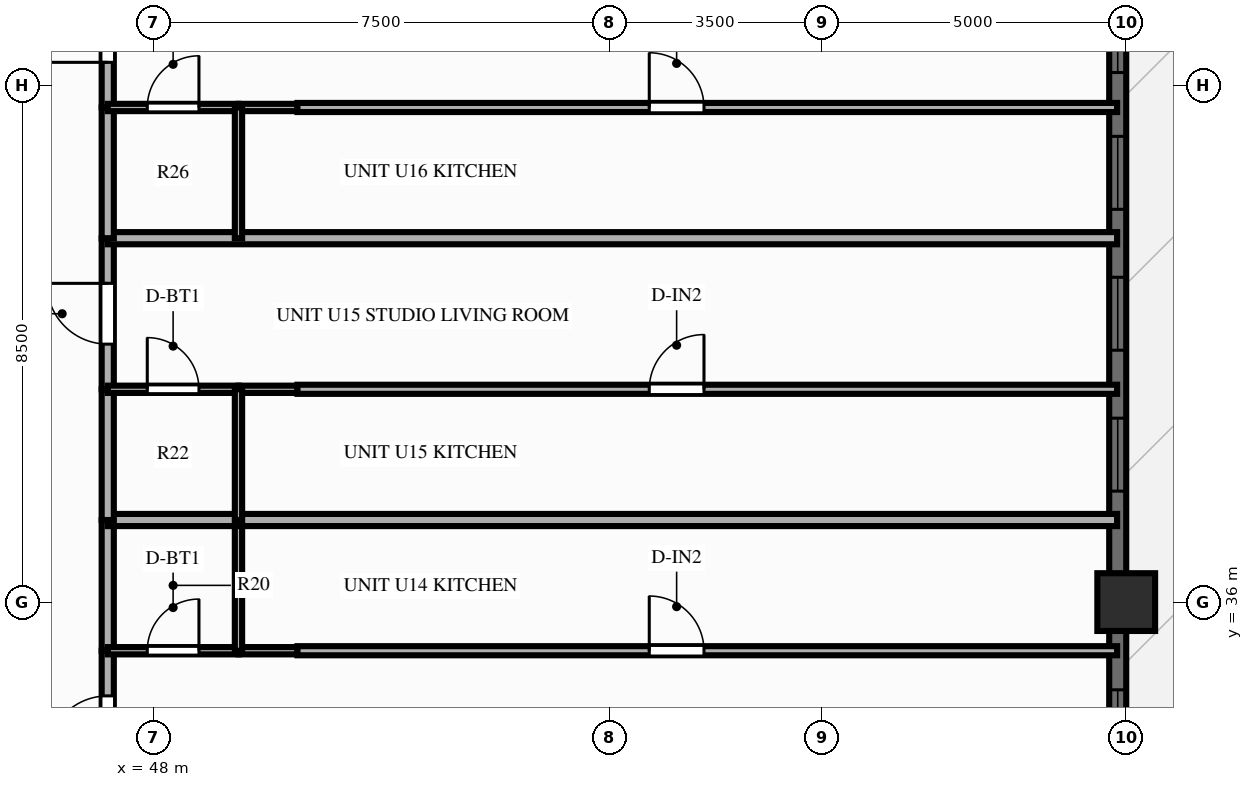
"""IFC4 building model, lengths in metres.
Left out: names, types, materials, properties, quantities, classifications, styles, units other than length and angle.
Written with IfcOpenShell. Run it as: python <this file> out.ifc"""

import sys

from ifc_helpers import new_model, si_unit, direction, frame, frame_2d, origin, origin_2d, place, context, subcontext, project, spatial, rectangle, extrude, source, transform, mapped, element, fill, save


model = new_model("IFC4")
c1 = context("Model", 3, precision=1e-05, world=origin(), true_north=direction((0.0, 1.0)))
c2 = subcontext(c1, "Body", "Model", "MODEL_VIEW")
j1 = project(units=[si_unit("LENGTHUNIT", "METRE"), si_unit("PLANEANGLEUNIT", "RADIAN")], contexts=[c1])
p1 = place(None, origin())
s1 = spatial("IfcSite", under=j1, at=p1, CompositionType="ELEMENT")
p2 = place(p1, origin())
s2 = spatial("IfcBuilding", under=s1, at=p2, CompositionType="ELEMENT")
p3 = place(p2, frame((0.0, 0.0, 122.85)))
s3 = spatial("IfcBuildingStorey", under=s2, at=p3, CompositionType="ELEMENT", Elevation=122.85)
m1 = source(origin(), c2, "Body", "SweptSolid", [
    extrude(rectangle(XDim=0.95, YDim=0.95, at=origin_2d()), origin(), (0.0, 0.0, 1.0), 3.9),
])
p4 = place(p3, frame((64.0, 36.0, 0.0), z_axis=(0.0, 0.0, 1.0), x_axis=(1.0, 0.0, 0.0)))
e1 = element("IfcColumn", 1, at=p4, inside=s3, PredefinedType="COLUMN", context=c2, shape_type="MappedRepresentation", body=[
    mapped(m1, transform((0.0, 0.0, 0.0), scale=1.0)),
])
p5 = place(p3, frame((63.86, 7.2, 0.0), z_axis=(0.0, 0.0, 1.0), x_axis=(0.0, 1.0, 0.0)))
e2 = element("IfcWall", 2, at=p5, inside=s3, PredefinedType="SOLIDWALL", context=c2, shape_type="SweptSolid", body=[
    extrude(rectangle(XDim=39.6, YDim=0.28, at=frame_2d((19.8, 0.0))), origin(), (0.0, 0.0, 1.0), 2.24),
])
p6 = place(p5, frame((0.89, 0.0, 0.25)))
e3 = element("IfcOpeningElement", 3, at=p6, cuts=e2, PredefinedType="OPENING", context=c2, shape_type="SweptSolid", body=[
    extrude(rectangle(XDim=1.2, YDim=1.5, at=frame_2d((0.6, 0.75))), frame((0.0, 0.152, 0.0), z_axis=(0.0, -1.0, 0.0), x_axis=(1.0, 0.0, 0.0)), (0.0, 0.0, 1.0), 0.304),
])
p7 = place(p5, frame((3.14, 0.0, 0.25)))
e4 = element("IfcOpeningElement", 4, at=p7, cuts=e2, PredefinedType="OPENING", context=c2, shape_type="SweptSolid", body=[
    extrude(rectangle(XDim=1.2, YDim=1.5, at=frame_2d((0.6, 0.75))), frame((0.0, 0.152, 0.0), z_axis=(0.0, -1.0, 0.0), x_axis=(1.0, 0.0, 0.0)), (0.0, 0.0, 1.0), 0.304),
])
p8 = place(p5, frame((5.458, 0.0, 0.25)))
e5 = element("IfcOpeningElement", 5, at=p8, cuts=e2, PredefinedType="OPENING", context=c2, shape_type="SweptSolid", body=[
    extrude(rectangle(XDim=1.2, YDim=1.5, at=frame_2d((0.6, 0.75))), frame((0.0, 0.152, 0.0), z_axis=(0.0, -1.0, 0.0), x_axis=(1.0, 0.0, 0.0)), (0.0, 0.0, 1.0), 0.304),
])
p9 = place(p5, frame((7.775, 0.0, 0.25)))
e6 = element("IfcOpeningElement", 6, at=p9, cuts=e2, PredefinedType="OPENING", context=c2, shape_type="SweptSolid", body=[
    extrude(rectangle(XDim=1.2, YDim=1.5, at=frame_2d((0.6, 0.75))), frame((0.0, 0.152, 0.0), z_axis=(0.0, -1.0, 0.0), x_axis=(1.0, 0.0, 0.0)), (0.0, 0.0, 1.0), 0.304),
])
p10 = place(p5, frame((12.242, 0.0, 0.25)))
e7 = element("IfcOpeningElement", 7, at=p10, cuts=e2, PredefinedType="OPENING", context=c2, shape_type="SweptSolid", body=[
    extrude(rectangle(XDim=1.2, YDim=1.5, at=frame_2d((0.6, 0.75))), frame((0.0, 0.152, 0.0), z_axis=(0.0, -1.0, 0.0), x_axis=(1.0, 0.0, 0.0)), (0.0, 0.0, 1.0), 0.304),
])
p11 = place(p5, frame((14.56, 0.0, 0.25)))
e8 = element("IfcOpeningElement", 8, at=p11, cuts=e2, PredefinedType="OPENING", context=c2, shape_type="SweptSolid", body=[
    extrude(rectangle(XDim=1.2, YDim=1.5, at=frame_2d((0.6, 0.75))), frame((0.0, 0.152, 0.0), z_axis=(0.0, -1.0, 0.0), x_axis=(1.0, 0.0, 0.0)), (0.0, 0.0, 1.0), 0.304),
])
p12 = place(p5, frame((16.877, 0.0, 0.25)))
e9 = element("IfcOpeningElement", 9, at=p12, cuts=e2, PredefinedType="OPENING", context=c2, shape_type="SweptSolid", body=[
    extrude(rectangle(XDim=1.2, YDim=1.5, at=frame_2d((0.6, 0.75))), frame((0.0, 0.152, 0.0), z_axis=(0.0, -1.0, 0.0), x_axis=(1.0, 0.0, 0.0)), (0.0, 0.0, 1.0), 0.304),
])
p13 = place(p5, frame((20.35, 0.0, 0.0), z_axis=(0.0, 0.0, 1.0), x_axis=(-1.0, 0.0, 0.0)))
e10 = element("IfcOpeningElement", 10, at=p13, cuts=e2, PredefinedType="OPENING", context=c2, shape_type="SweptSolid", body=[
    extrude(rectangle(XDim=1.1, YDim=2.15, at=frame_2d((0.55, 1.075))), frame((0.0, 0.152, 0.0), z_axis=(0.0, -1.0, 0.0), x_axis=(1.0, 0.0, 0.0)), (0.0, 0.0, 1.0), 0.304),
])
p14 = place(p5, frame((21.522, 0.0, 0.25)))
e11 = element("IfcOpeningElement", 11, at=p14, cuts=e2, PredefinedType="OPENING", context=c2, shape_type="SweptSolid", body=[
    extrude(rectangle(XDim=1.2, YDim=1.5, at=frame_2d((0.6, 0.75))), frame((0.0, 0.152, 0.0), z_axis=(0.0, -1.0, 0.0), x_axis=(1.0, 0.0, 0.0)), (0.0, 0.0, 1.0), 0.304),
])
p15 = place(p5, frame((23.84, 0.0, 0.25)))
e12 = element("IfcOpeningElement", 12, at=p15, cuts=e2, PredefinedType="OPENING", context=c2, shape_type="SweptSolid", body=[
    extrude(rectangle(XDim=1.2, YDim=1.5, at=frame_2d((0.6, 0.75))), frame((0.0, 0.152, 0.0), z_axis=(0.0, -1.0, 0.0), x_axis=(1.0, 0.0, 0.0)), (0.0, 0.0, 1.0), 0.304),
])
p16 = place(p5, frame((26.157, 0.0, 0.25)))
e13 = element("IfcOpeningElement", 13, at=p16, cuts=e2, PredefinedType="OPENING", context=c2, shape_type="SweptSolid", body=[
    extrude(rectangle(XDim=1.2, YDim=1.5, at=frame_2d((0.6, 0.75))), frame((0.0, 0.152, 0.0), z_axis=(0.0, -1.0, 0.0), x_axis=(1.0, 0.0, 0.0)), (0.0, 0.0, 1.0), 0.304),
])
p17 = place(p5, frame((30.625, 0.0, 0.25)))
e14 = element("IfcOpeningElement", 14, at=p17, cuts=e2, PredefinedType="OPENING", context=c2, shape_type="SweptSolid", body=[
    extrude(rectangle(XDim=1.2, YDim=1.5, at=frame_2d((0.6, 0.75))), frame((0.0, 0.152, 0.0), z_axis=(0.0, -1.0, 0.0), x_axis=(1.0, 0.0, 0.0)), (0.0, 0.0, 1.0), 0.304),
])
p18 = place(p5, frame((32.942, 0.0, 0.25)))
e15 = element("IfcOpeningElement", 15, at=p18, cuts=e2, PredefinedType="OPENING", context=c2, shape_type="SweptSolid", body=[
    extrude(rectangle(XDim=1.2, YDim=1.5, at=frame_2d((0.6, 0.75))), frame((0.0, 0.152, 0.0), z_axis=(0.0, -1.0, 0.0), x_axis=(1.0, 0.0, 0.0)), (0.0, 0.0, 1.0), 0.304),
])
p19 = place(p5, frame((35.26, 0.0, 0.25)))
e16 = element("IfcOpeningElement", 16, at=p19, cuts=e2, PredefinedType="OPENING", context=c2, shape_type="SweptSolid", body=[
    extrude(rectangle(XDim=1.2, YDim=1.5, at=frame_2d((0.6, 0.75))), frame((0.0, 0.152, 0.0), z_axis=(0.0, -1.0, 0.0), x_axis=(1.0, 0.0, 0.0)), (0.0, 0.0, 1.0), 0.304),
])
p20 = place(p5, frame((37.51, 0.0, 0.25)))
e17 = element("IfcOpeningElement", 17, at=p20, cuts=e2, PredefinedType="OPENING", context=c2, shape_type="SweptSolid", body=[
    extrude(rectangle(XDim=1.2, YDim=1.5, at=frame_2d((0.6, 0.75))), frame((0.0, 0.152, 0.0), z_axis=(0.0, -1.0, 0.0), x_axis=(1.0, 0.0, 0.0)), (0.0, 0.0, 1.0), 0.304),
])
p21 = place(p3, frame((47.25, 32.715, 0.0), z_axis=(0.0, 0.0, 1.0), x_axis=(0.0, 1.0, 0.0)))
e18 = element("IfcWall", 18, at=p21, inside=s3, PredefinedType="PARTITIONING", context=c2, shape_type="SweptSolid", body=[
    extrude(rectangle(XDim=2.485, YDim=0.2, at=frame_2d((1.242, 0.0))), origin(), (0.0, 0.0, 1.0), 3.56),
])
p22 = place(p21, frame((0.742, 0.0, 0.0)))
e19 = element("IfcOpeningElement", 19, at=p22, cuts=e18, PredefinedType="OPENING", context=c2, shape_type="SweptSolid", body=[
    extrude(rectangle(XDim=1.0, YDim=2.15, at=frame_2d((0.5, 1.075))), frame((0.0, 0.112, 0.0), z_axis=(0.0, -1.0, 0.0), x_axis=(1.0, 0.0, 0.0)), (0.0, 0.0, 1.0), 0.224),
])
p23 = place(p3, frame((47.25, 35.2, 0.0), z_axis=(0.0, 0.0, 1.0), x_axis=(0.0, 1.0, 0.0)))
e20 = element("IfcWall", 20, at=p23, inside=s3, PredefinedType="PARTITIONING", context=c2, shape_type="SweptSolid", body=[
    extrude(rectangle(XDim=2.15, YDim=0.2, at=frame_2d((1.075, 0.0))), origin(), (0.0, 0.0, 1.0), 3.56),
])
p24 = place(p3, frame((47.25, 35.2, 0.0), z_axis=(0.0, 0.0, 1.0), x_axis=(1.0, 0.0, 0.0)))
e21 = element("IfcWall", 21, at=p24, inside=s3, PredefinedType="PARTITIONING", context=c2, shape_type="SweptSolid", body=[
    extrude(rectangle(XDim=2.15, YDim=0.12, at=frame_2d((1.075, 0.0))), origin(), (0.0, 0.0, 1.0), 3.56),
])
p25 = place(p24, frame((0.65, 0.0, 0.0)))
e22 = element("IfcOpeningElement", 22, at=p25, cuts=e21, PredefinedType="OPENING", context=c2, shape_type="SweptSolid", body=[
    extrude(rectangle(XDim=0.85, YDim=2.05, at=frame_2d((0.425, 1.025))), frame((0.0, 0.072, 0.0), z_axis=(0.0, -1.0, 0.0), x_axis=(1.0, 0.0, 0.0)), (0.0, 0.0, 1.0), 0.144),
])
p26 = place(p3, frame((49.4, 35.2, 0.0), z_axis=(0.0, 0.0, 1.0), x_axis=(1.0, 0.0, 0.0)))
e23 = element("IfcWall", 23, at=p26, inside=s3, PredefinedType="PARTITIONING", context=c2, shape_type="SweptSolid", body=[
    extrude(rectangle(XDim=0.97, YDim=0.12, at=frame_2d((0.485, 0.0))), origin(), (0.0, 0.0, 1.0), 3.56),
])
p27 = place(p3, frame((49.4, 35.2, 0.0), z_axis=(0.0, 0.0, 1.0), x_axis=(0.0, 1.0, 0.0)))
e24 = element("IfcWall", 24, at=p27, inside=s3, PredefinedType="PARTITIONING", context=c2, shape_type="SweptSolid", body=[
    extrude(rectangle(XDim=2.15, YDim=0.12, at=frame_2d((1.075, 0.0))), origin(), (0.0, 0.0, 1.0), 3.56),
])
p28 = place(p3, frame((50.37, 35.2, 0.0), z_axis=(0.0, 0.0, 1.0), x_axis=(1.0, 0.0, 0.0)))
e25 = element("IfcWall", 25, at=p28, inside=s3, PredefinedType="PARTITIONING", context=c2, shape_type="SweptSolid", body=[
    extrude(rectangle(XDim=13.48, YDim=0.15, at=frame_2d((6.74, 0.0))), origin(), (0.0, 0.0, 1.0), 3.56),
])
p29 = place(p28, frame((5.786, 0.0, 0.0)))
e26 = element("IfcOpeningElement", 26, at=p29, cuts=e25, PredefinedType="OPENING", context=c2, shape_type="SweptSolid", body=[
    extrude(rectangle(XDim=0.9, YDim=2.1, at=frame_2d((0.45, 1.05))), frame((0.0, 0.087, 0.0), z_axis=(0.0, -1.0, 0.0), x_axis=(1.0, 0.0, 0.0)), (0.0, 0.0, 1.0), 0.174),
])
p30 = place(p3, frame((47.25, 37.35, 0.0), z_axis=(0.0, 0.0, 1.0), x_axis=(1.0, 0.0, 0.0)))
e27 = element("IfcWall", 27, at=p30, inside=s3, PredefinedType="PARTITIONING", context=c2, shape_type="SweptSolid", body=[
    extrude(rectangle(XDim=16.6, YDim=0.2, at=frame_2d((8.3, 0.0))), origin(), (0.0, 0.0, 1.0), 3.56),
])
p31 = place(p3, frame((47.25, 37.35, 0.0), z_axis=(0.0, 0.0, 1.0), x_axis=(0.0, 1.0, 0.0)))
e28 = element("IfcWall", 28, at=p31, inside=s3, PredefinedType="PARTITIONING", context=c2, shape_type="SweptSolid", body=[
    extrude(rectangle(XDim=2.15, YDim=0.2, at=frame_2d((1.075, 0.0))), origin(), (0.0, 0.0, 1.0), 3.56),
])
p32 = place(p3, frame((47.25, 39.5, 0.0), z_axis=(0.0, 0.0, 1.0), x_axis=(0.0, 1.0, 0.0)))
e29 = element("IfcWall", 29, at=p32, inside=s3, PredefinedType="PARTITIONING", context=c2, shape_type="SweptSolid", body=[
    extrude(rectangle(XDim=2.485, YDim=0.2, at=frame_2d((1.243, 0.0))), origin(), (0.0, 0.0, 1.0), 3.56),
])
p33 = place(p32, frame((0.742, 0.0, 0.0)))
e30 = element("IfcOpeningElement", 30, at=p33, cuts=e29, PredefinedType="OPENING", context=c2, shape_type="SweptSolid", body=[
    extrude(rectangle(XDim=1.0, YDim=2.15, at=frame_2d((0.5, 1.075))), frame((0.0, 0.112, 0.0), z_axis=(0.0, -1.0, 0.0), x_axis=(1.0, 0.0, 0.0)), (0.0, 0.0, 1.0), 0.224),
])
p34 = place(p3, frame((47.25, 39.5, 0.0), z_axis=(0.0, 0.0, 1.0), x_axis=(1.0, 0.0, 0.0)))
e31 = element("IfcWall", 31, at=p34, inside=s3, PredefinedType="PARTITIONING", context=c2, shape_type="SweptSolid", body=[
    extrude(rectangle(XDim=2.15, YDim=0.12, at=frame_2d((1.075, 0.0))), origin(), (0.0, 0.0, 1.0), 3.56),
])
p35 = place(p34, frame((0.65, 0.0, 0.0)))
e32 = element("IfcOpeningElement", 32, at=p35, cuts=e31, PredefinedType="OPENING", context=c2, shape_type="SweptSolid", body=[
    extrude(rectangle(XDim=0.85, YDim=2.05, at=frame_2d((0.425, 1.025))), frame((0.0, 0.072, 0.0), z_axis=(0.0, -1.0, 0.0), x_axis=(1.0, 0.0, 0.0)), (0.0, 0.0, 1.0), 0.144),
])
p36 = place(p3, frame((49.4, 39.5, 0.0), z_axis=(0.0, 0.0, 1.0), x_axis=(1.0, 0.0, 0.0)))
e33 = element("IfcWall", 33, at=p36, inside=s3, PredefinedType="PARTITIONING", context=c2, shape_type="SweptSolid", body=[
    extrude(rectangle(XDim=0.97, YDim=0.12, at=frame_2d((0.485, 0.0))), origin(), (0.0, 0.0, 1.0), 3.56),
])
p37 = place(p3, frame((49.4, 37.35, 0.0), z_axis=(0.0, 0.0, 1.0), x_axis=(0.0, 1.0, 0.0)))
e34 = element("IfcWall", 34, at=p37, inside=s3, PredefinedType="PARTITIONING", context=c2, shape_type="SweptSolid", body=[
    extrude(rectangle(XDim=2.15, YDim=0.12, at=frame_2d((1.075, 0.0))), origin(), (0.0, 0.0, 1.0), 3.56),
])
p38 = place(p3, frame((50.37, 39.5, 0.0), z_axis=(0.0, 0.0, 1.0), x_axis=(1.0, 0.0, 0.0)))
e35 = element("IfcWall", 35, at=p38, inside=s3, PredefinedType="PARTITIONING", context=c2, shape_type="SweptSolid", body=[
    extrude(rectangle(XDim=13.48, YDim=0.15, at=frame_2d((6.74, 0.0))), origin(), (0.0, 0.0, 1.0), 3.56),
])
p39 = place(p38, frame((5.786, 0.0, 0.0)))
e36 = element("IfcOpeningElement", 36, at=p39, cuts=e35, PredefinedType="OPENING", context=c2, shape_type="SweptSolid", body=[
    extrude(rectangle(XDim=0.9, YDim=2.1, at=frame_2d((0.45, 1.05))), frame((0.0, 0.087, 0.0), z_axis=(0.0, -1.0, 0.0), x_axis=(1.0, 0.0, 0.0)), (0.0, 0.0, 1.0), 0.174),
])
p40 = place(p3, frame((47.25, 41.985, 0.0), z_axis=(0.0, 0.0, 1.0), x_axis=(1.0, 0.0, 0.0)))
e37 = element("IfcWall", 37, at=p40, inside=s3, PredefinedType="PARTITIONING", context=c2, shape_type="SweptSolid", body=[
    extrude(rectangle(XDim=16.6, YDim=0.2, at=frame_2d((8.3, 0.0))), origin(), (0.0, 0.0, 1.0), 3.56),
])
p41 = place(p3, frame((47.25, 41.985, 0.0), z_axis=(0.0, 0.0, 1.0), x_axis=(0.0, 1.0, 0.0)))
e38 = element("IfcWall", 38, at=p41, inside=s3, PredefinedType="PARTITIONING", context=c2, shape_type="SweptSolid", body=[
    extrude(rectangle(XDim=2.15, YDim=0.2, at=frame_2d((1.075, 0.0))), origin(), (0.0, 0.0, 1.0), 3.56),
])
p42 = place(p3, frame((47.25, 44.135, 0.0), z_axis=(0.0, 0.0, 1.0), x_axis=(0.0, 1.0, 0.0)))
e39 = element("IfcWall", 39, at=p42, inside=s3, PredefinedType="PARTITIONING", context=c2, shape_type="SweptSolid", body=[
    extrude(rectangle(XDim=2.485, YDim=0.2, at=frame_2d((1.243, 0.0))), origin(), (0.0, 0.0, 1.0), 3.56),
])
p43 = place(p42, frame((0.742, 0.0, 0.0)))
e40 = element("IfcOpeningElement", 40, at=p43, cuts=e39, PredefinedType="OPENING", context=c2, shape_type="SweptSolid", body=[
    extrude(rectangle(XDim=1.0, YDim=2.15, at=frame_2d((0.5, 1.075))), frame((0.0, 0.112, 0.0), z_axis=(0.0, -1.0, 0.0), x_axis=(1.0, 0.0, 0.0)), (0.0, 0.0, 1.0), 0.224),
])
p44 = place(p3, frame((47.25, 44.135, 0.0), z_axis=(0.0, 0.0, 1.0), x_axis=(1.0, 0.0, 0.0)))
e41 = element("IfcWall", 41, at=p44, inside=s3, PredefinedType="PARTITIONING", context=c2, shape_type="SweptSolid", body=[
    extrude(rectangle(XDim=2.15, YDim=0.12, at=frame_2d((1.075, 0.0))), origin(), (0.0, 0.0, 1.0), 3.56),
])
p45 = place(p44, frame((0.65, 0.0, 0.0)))
e42 = element("IfcOpeningElement", 42, at=p45, cuts=e41, PredefinedType="OPENING", context=c2, shape_type="SweptSolid", body=[
    extrude(rectangle(XDim=0.85, YDim=2.05, at=frame_2d((0.425, 1.025))), frame((0.0, 0.072, 0.0), z_axis=(0.0, -1.0, 0.0), x_axis=(1.0, 0.0, 0.0)), (0.0, 0.0, 1.0), 0.144),
])
p46 = place(p3, frame((49.4, 44.135, 0.0), z_axis=(0.0, 0.0, 1.0), x_axis=(1.0, 0.0, 0.0)))
e43 = element("IfcWall", 43, at=p46, inside=s3, PredefinedType="PARTITIONING", context=c2, shape_type="SweptSolid", body=[
    extrude(rectangle(XDim=0.97, YDim=0.12, at=frame_2d((0.485, 0.0))), origin(), (0.0, 0.0, 1.0), 3.56),
])
p47 = place(p3, frame((49.4, 41.985, 0.0), z_axis=(0.0, 0.0, 1.0), x_axis=(0.0, 1.0, 0.0)))
e44 = element("IfcWall", 44, at=p47, inside=s3, PredefinedType="PARTITIONING", context=c2, shape_type="SweptSolid", body=[
    extrude(rectangle(XDim=2.15, YDim=0.12, at=frame_2d((1.075, 0.0))), origin(), (0.0, 0.0, 1.0), 3.56),
])
p48 = place(p3, frame((50.37, 44.135, 0.0), z_axis=(0.0, 0.0, 1.0), x_axis=(1.0, 0.0, 0.0)))
e45 = element("IfcWall", 45, at=p48, inside=s3, PredefinedType="PARTITIONING", context=c2, shape_type="SweptSolid", body=[
    extrude(rectangle(XDim=13.48, YDim=0.15, at=frame_2d((6.74, 0.0))), origin(), (0.0, 0.0, 1.0), 3.56),
])
p49 = place(p48, frame((5.786, 0.0, 0.0)))
e46 = element("IfcOpeningElement", 46, at=p49, cuts=e45, PredefinedType="OPENING", context=c2, shape_type="SweptSolid", body=[
    extrude(rectangle(XDim=0.9, YDim=2.1, at=frame_2d((0.45, 1.05))), frame((0.0, 0.087, 0.0), z_axis=(0.0, -1.0, 0.0), x_axis=(1.0, 0.0, 0.0)), (0.0, 0.0, 1.0), 0.174),
])
m2 = source(origin(), c2, "Body", "SweptSolid", [
    extrude(rectangle(XDim=1.2, YDim=1.5, at=frame_2d((0.6, 0.75))), frame((0.0, 0.03, 0.0), z_axis=(0.0, -1.0, 0.0), x_axis=(1.0, 0.0, 0.0)), (0.0, 0.0, 1.0), 0.06),
])
p50 = place(p16, origin())
e47 = element("IfcWindow", 47, at=p50, inside=s3, PartitioningType="SINGLE_PANEL", PredefinedType="WINDOW", context=c2, shape_type="MappedRepresentation", body=[
    mapped(m2, transform((0.0, 0.0, 0.0), scale=1.0)),
])
fill(e13, e47)
p51 = place(p17, origin())
e48 = element("IfcWindow", 48, at=p51, inside=s3, PartitioningType="SINGLE_PANEL", PredefinedType="WINDOW", context=c2, shape_type="MappedRepresentation", body=[
    mapped(m2, transform((0.0, 0.0, 0.0), scale=1.0)),
])
fill(e14, e48)
p52 = place(p18, origin())
e49 = element("IfcWindow", 49, at=p52, inside=s3, PartitioningType="SINGLE_PANEL", PredefinedType="WINDOW", context=c2, shape_type="MappedRepresentation", body=[
    mapped(m2, transform((0.0, 0.0, 0.0), scale=1.0)),
])
fill(e15, e49)
p53 = place(p19, origin())
e50 = element("IfcWindow", 50, at=p53, inside=s3, PartitioningType="SINGLE_PANEL", PredefinedType="WINDOW", context=c2, shape_type="MappedRepresentation", body=[
    mapped(m2, transform((0.0, 0.0, 0.0), scale=1.0)),
])
fill(e16, e50)
p54 = place(p20, origin())
e51 = element("IfcWindow", 51, at=p54, inside=s3, PartitioningType="SINGLE_PANEL", PredefinedType="WINDOW", context=c2, shape_type="MappedRepresentation", body=[
    mapped(m2, transform((0.0, 0.0, 0.0), scale=1.0)),
])
fill(e17, e51)
m3 = source(origin(), c2, "Body", "SweptSolid", [
    extrude(rectangle(XDim=1.0, YDim=2.15, at=frame_2d((0.5, 1.075))), frame((0.0, 0.025, 0.0), z_axis=(0.0, -1.0, 0.0), x_axis=(1.0, 0.0, 0.0)), (0.0, 0.0, 1.0), 0.05),
])
p55 = place(p22, origin())
e52 = element("IfcDoor", 52, at=p55, inside=s3, OperationType="SINGLE_SWING_LEFT", PredefinedType="DOOR", context=c2, shape_type="MappedRepresentation", body=[
    mapped(m3, transform((0.0, 0.0, 0.0), scale=1.0)),
])
fill(e19, e52)
m4 = source(origin(), c2, "Body", "SweptSolid", [
    extrude(rectangle(XDim=0.85, YDim=2.05, at=frame_2d((0.425, 1.025))), frame((0.0, 0.025, 0.0), z_axis=(0.0, -1.0, 0.0), x_axis=(1.0, 0.0, 0.0)), (0.0, 0.0, 1.0), 0.05),
])
p56 = place(p25, origin())
e53 = element("IfcDoor", 53, at=p56, inside=s3, OperationType="SINGLE_SWING_RIGHT", PredefinedType="DOOR", context=c2, shape_type="MappedRepresentation", body=[
    mapped(m4, transform((0.0, 0.0, 0.0), scale=1.0)),
])
fill(e22, e53)
m5 = source(origin(), c2, "Body", "SweptSolid", [
    extrude(rectangle(XDim=0.9, YDim=2.1, at=frame_2d((0.45, 1.05))), frame((0.0, 0.025, 0.0), z_axis=(0.0, -1.0, 0.0), x_axis=(1.0, 0.0, 0.0)), (0.0, 0.0, 1.0), 0.05),
])
p57 = place(p29, origin())
e54 = element("IfcDoor", 54, at=p57, inside=s3, OperationType="SINGLE_SWING_LEFT", PredefinedType="DOOR", context=c2, shape_type="MappedRepresentation", body=[
    mapped(m5, transform((0.0, 0.0, 0.0), scale=1.0)),
])
fill(e26, e54)
p58 = place(p33, origin())
e55 = element("IfcDoor", 55, at=p58, inside=s3, OperationType="SINGLE_SWING_RIGHT", PredefinedType="DOOR", context=c2, shape_type="MappedRepresentation", body=[
    mapped(m3, transform((0.0, 0.0, 0.0), scale=1.0)),
])
fill(e30, e55)
p59 = place(p35, origin())
e56 = element("IfcDoor", 56, at=p59, inside=s3, OperationType="SINGLE_SWING_LEFT", PredefinedType="DOOR", context=c2, shape_type="MappedRepresentation", body=[
    mapped(m4, transform((0.0, 0.0, 0.0), scale=1.0)),
])
fill(e32, e56)
p60 = place(p39, origin())
e57 = element("IfcDoor", 57, at=p60, inside=s3, OperationType="SINGLE_SWING_RIGHT", PredefinedType="DOOR", context=c2, shape_type="MappedRepresentation", body=[
    mapped(m5, transform((0.0, 0.0, 0.0), scale=1.0)),
])
fill(e36, e57)
p61 = place(p43, origin())
e58 = element("IfcDoor", 58, at=p61, inside=s3, OperationType="SINGLE_SWING_LEFT", PredefinedType="DOOR", context=c2, shape_type="MappedRepresentation", body=[
    mapped(m3, transform((0.0, 0.0, 0.0), scale=1.0)),
])
fill(e40, e58)
p62 = place(p45, origin())
e59 = element("IfcDoor", 59, at=p62, inside=s3, OperationType="SINGLE_SWING_RIGHT", PredefinedType="DOOR", context=c2, shape_type="MappedRepresentation", body=[
    mapped(m4, transform((0.0, 0.0, 0.0), scale=1.0)),
])
fill(e42, e59)
p63 = place(p49, origin())
e60 = element("IfcDoor", 60, at=p63, inside=s3, OperationType="SINGLE_SWING_LEFT", PredefinedType="DOOR", context=c2, shape_type="MappedRepresentation", body=[
    mapped(m5, transform((0.0, 0.0, 0.0), scale=1.0)),
])
fill(e46, e60)
save(model, sys.argv[1])
